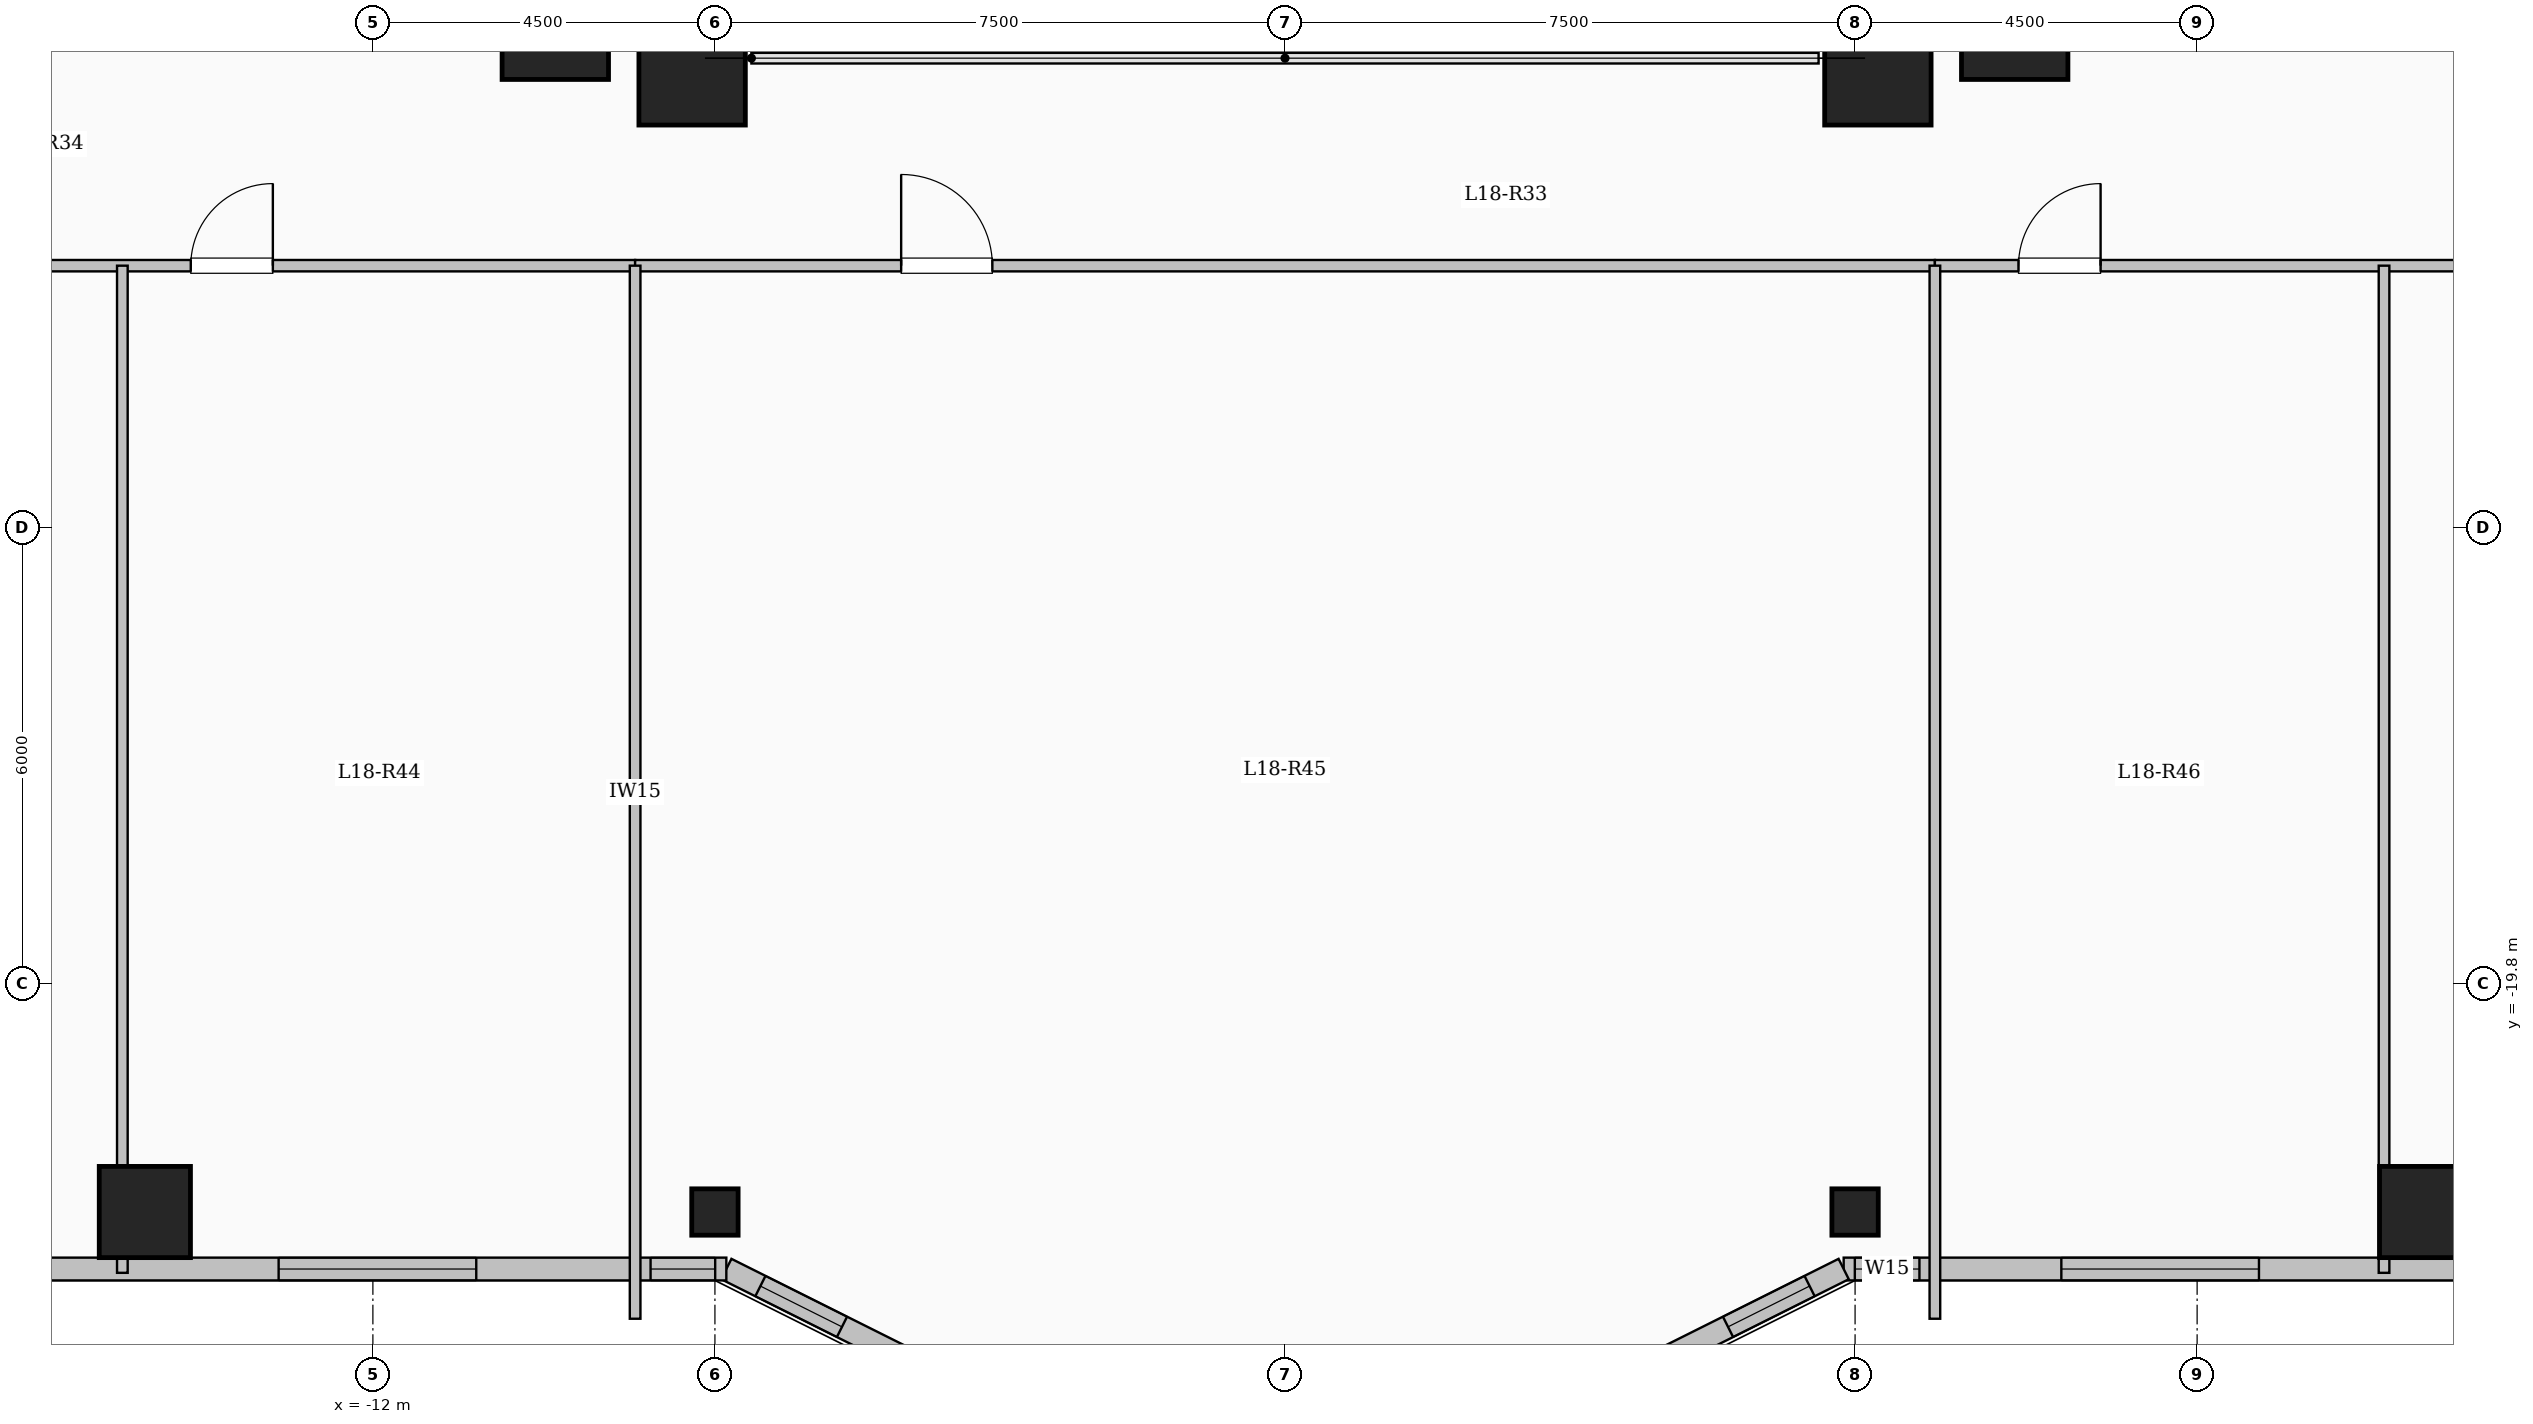
"""IFC4 building model, lengths in metres.
Left out: names, types, materials, properties, quantities, classifications, styles, units other than length and angle.
Written with IfcOpenShell. Run it as: python <this file> out.ifc"""

import sys

from ifc_helpers import new_model, si_unit, direction, frame, frame_2d, origin, origin_2d, place, context, subcontext, project, spatial, rectangle, hollow_circle, extrude, element, fill, save


model = new_model("IFC4")
c1 = context("Model", 3, precision=1e-05, world=origin(), true_north=direction((0.0, 1.0)))
c2 = subcontext(c1, "Body", "Model", "MODEL_VIEW")
j1 = project(units=[si_unit("LENGTHUNIT", "METRE"), si_unit("PLANEANGLEUNIT", "RADIAN")], contexts=[c1])
p1 = place(None, origin())
s1 = spatial("IfcSite", under=j1, at=p1, CompositionType="ELEMENT")
p2 = place(p1, origin())
s2 = spatial("IfcBuilding", under=s1, at=p2, CompositionType="ELEMENT")
p3 = place(p2, frame((0.0, 0.0, 68.7)))
s3 = spatial("IfcBuildingStorey", under=s2, at=p3, CompositionType="ELEMENT", Elevation=68.7)
for number, where, z_axis, x_axis in (
    (1, (-7.8, -7.8, 0.0), (0.0, 0.0, 1.0), (1.0, 0.0, 0.0)),
    (2, (7.8, -7.8, 0.0), (0.0, 0.0, 1.0), (1.0, 0.0, 0.0)),
    (3, (-9.6, -7.2, 0.0), (0.0, 0.0, 1.0), (1.0, 0.0, 0.0)),
    (4, (9.6, -7.2, 0.0), (0.0, 0.0, 1.0), (1.0, 0.0, 0.0)),
):
    element("IfcColumn", number, at=place(p3, frame(where, z_axis=z_axis, x_axis=x_axis)), inside=s3, PredefinedType="COLUMN", context=c2, shape_type="SweptSolid", body=[
        extrude(rectangle(XDim=1.4, YDim=1.4, at=origin_2d()), origin(), (0.0, 0.0, 1.0), 4.5),
    ])
p4 = place(p3, frame((-15.0, -22.8, 0.0), z_axis=(0.0, 0.0, 1.0), x_axis=(1.0, 0.0, 0.0)))
e5 = element("IfcColumn", 5, at=p4, inside=s3, PredefinedType="COLUMN", context=c2, shape_type="SweptSolid", body=[
    extrude(rectangle(XDim=1.2, YDim=1.2, at=origin_2d()), origin(), (0.0, 0.0, 1.0), 4.5),
])
for number, where, z_axis, x_axis in (
    (6, (-7.5, -22.8, 0.0), (0.0, 0.0, 1.0), (1.0, 0.0, 0.0)),
    (7, (7.5, -22.8, 0.0), (0.0, 0.0, 1.0), (1.0, 0.0, 0.0)),
):
    element("IfcColumn", number, at=place(p3, frame(where, z_axis=z_axis, x_axis=x_axis)), inside=s3, PredefinedType="COLUMN", context=c2, shape_type="SweptSolid", body=[
        extrude(hollow_circle(Radius=0.305, WallThickness=0.025, at=origin_2d()), origin(), (0.0, 0.0, 1.0), 4.5),
    ])
p5 = place(p3, frame((15.0, -22.8, 0.0), z_axis=(0.0, 0.0, 1.0), x_axis=(1.0, 0.0, 0.0)))
e8 = element("IfcColumn", 8, at=p5, inside=s3, PredefinedType="COLUMN", context=c2, shape_type="SweptSolid", body=[
    extrude(rectangle(XDim=1.2, YDim=1.2, at=origin_2d()), origin(), (0.0, 0.0, 1.0), 4.5),
])
p6 = place(p3, frame((7.62, -7.62, 0.0), z_axis=(0.0, 0.0, 1.0), x_axis=(0.0, 1.0, 0.0)))
e9 = element("IfcWall", 9, at=p6, inside=s3, PredefinedType="SOLIDWALL", context=c2, shape_type="SweptSolid", body=[
    extrude(rectangle(XDim=15.24, YDim=0.24, at=frame_2d((7.62, 0.0))), origin(), (0.0, 0.0, 1.0), 4.2),
])
p7 = place(p6, frame((6.92, 0.0, 0.95)))
e10 = element("IfcOpeningElement", 10, at=p7, cuts=e9, PredefinedType="OPENING", context=c2, shape_type="SweptSolid", body=[
    extrude(rectangle(XDim=1.4, YDim=1.5, at=frame_2d((0.7, 0.75))), frame((0.0, 0.13, 0.0), z_axis=(0.0, -1.0, 0.0), x_axis=(1.0, 0.0, 0.0)), (0.0, 0.0, 1.0), 0.26),
])
p8 = place(p3, frame((-7.62, 7.62, 0.0), z_axis=(0.0, 0.0, 1.0), x_axis=(0.0, -1.0, 0.0)))
e11 = element("IfcWall", 11, at=p8, inside=s3, PredefinedType="SOLIDWALL", context=c2, shape_type="SweptSolid", body=[
    extrude(rectangle(XDim=15.24, YDim=0.24, at=frame_2d((7.62, 0.0))), origin(), (0.0, 0.0, 1.0), 4.2),
])
p9 = place(p8, frame((6.92, 0.0, 0.95)))
e12 = element("IfcOpeningElement", 12, at=p9, cuts=e11, PredefinedType="OPENING", context=c2, shape_type="SweptSolid", body=[
    extrude(rectangle(XDim=1.4, YDim=1.5, at=frame_2d((0.7, 0.75))), frame((0.0, 0.13, 0.0), z_axis=(0.0, -1.0, 0.0), x_axis=(1.0, 0.0, 0.0)), (0.0, 0.0, 1.0), 0.26),
])
p10 = place(p3, frame((22.65, -23.55, 0.0), z_axis=(0.0, 0.0, 1.0), x_axis=(-1.0, 0.0, 0.0)))
e13 = element("IfcWall", 13, at=p10, inside=s3, PredefinedType="SOLIDWALL", context=c2, shape_type="SweptSolid", body=[
    extrude(rectangle(XDim=15.3, YDim=0.3, at=frame_2d((7.65, 0.0))), origin(), (0.0, 0.0, 1.0), 4.2),
])
p11 = place(p10, frame((2.788, 0.0, 0.85)))
e14 = element("IfcOpeningElement", 14, at=p11, cuts=e13, PredefinedType="OPENING", context=c2, shape_type="SweptSolid", body=[
    extrude(rectangle(XDim=2.6, YDim=2.4, at=frame_2d((1.3, 1.2))), frame((0.0, 0.16, 0.0), z_axis=(0.0, -1.0, 0.0), x_axis=(1.0, 0.0, 0.0)), (0.0, 0.0, 1.0), 0.32),
])
p12 = place(p10, frame((9.836, 0.0, 0.85)))
e15 = element("IfcOpeningElement", 15, at=p12, cuts=e13, PredefinedType="OPENING", context=c2, shape_type="SweptSolid", body=[
    extrude(rectangle(XDim=2.6, YDim=2.4, at=frame_2d((1.3, 1.2))), frame((0.0, 0.16, 0.0), z_axis=(0.0, -1.0, 0.0), x_axis=(1.0, 0.0, 0.0)), (0.0, 0.0, 1.0), 0.32),
])
p13 = place(p10, frame((14.303, 0.0, 0.95)))
e16 = element("IfcOpeningElement", 16, at=p13, cuts=e13, PredefinedType="OPENING", context=c2, shape_type="SweptSolid", body=[
    extrude(rectangle(XDim=0.85, YDim=1.5, at=frame_2d((0.425, 0.75))), frame((0.0, 0.16, 0.0), z_axis=(0.0, -1.0, 0.0), x_axis=(1.0, 0.0, 0.0)), (0.0, 0.0, 1.0), 0.32),
])
p14 = place(p3, frame((7.35, -23.55, 0.0), z_axis=(0.0, 0.0, 1.0), x_axis=(-0.894427191, -0.4472135955, 0.0)))
e17 = element("IfcWall", 17, at=p14, inside=s3, PredefinedType="SOLIDWALL", context=c2, shape_type="SweptSolid", body=[
    extrude(rectangle(XDim=3.354, YDim=0.3, at=frame_2d((1.677, 0.0))), origin(), (0.0, 0.0, 1.0), 4.2),
])
p15 = place(p14, frame((0.501, 0.0, 0.95)))
e18 = element("IfcOpeningElement", 18, at=p15, cuts=e17, PredefinedType="OPENING", context=c2, shape_type="SweptSolid", body=[
    extrude(rectangle(XDim=1.2, YDim=1.5, at=frame_2d((0.6, 0.75))), frame((0.0, 0.16, 0.0), z_axis=(0.0, -1.0, 0.0), x_axis=(1.0, 0.0, 0.0)), (0.0, 0.0, 1.0), 0.32),
])
p16 = place(p3, frame((-4.35, -25.05, 0.0), z_axis=(0.0, 0.0, 1.0), x_axis=(-0.894427191, 0.4472135955, 0.0)))
e19 = element("IfcWall", 19, at=p16, inside=s3, PredefinedType="SOLIDWALL", context=c2, shape_type="SweptSolid", body=[
    extrude(rectangle(XDim=3.354, YDim=0.3, at=frame_2d((1.677, 0.0))), origin(), (0.0, 0.0, 1.0), 4.2),
])
p17 = place(p16, frame((1.653, 0.0, 0.95)))
e20 = element("IfcOpeningElement", 20, at=p17, cuts=e19, PredefinedType="OPENING", context=c2, shape_type="SweptSolid", body=[
    extrude(rectangle(XDim=1.2, YDim=1.5, at=frame_2d((0.6, 0.75))), frame((0.0, 0.16, 0.0), z_axis=(0.0, -1.0, 0.0), x_axis=(1.0, 0.0, 0.0)), (0.0, 0.0, 1.0), 0.32),
])
p18 = place(p3, frame((-7.35, -23.55, 0.0), z_axis=(0.0, 0.0, 1.0), x_axis=(-1.0, 0.0, 0.0)))
e21 = element("IfcWall", 21, at=p18, inside=s3, PredefinedType="SOLIDWALL", context=c2, shape_type="SweptSolid", body=[
    extrude(rectangle(XDim=15.3, YDim=0.3, at=frame_2d((7.65, 0.0))), origin(), (0.0, 0.0, 1.0), 4.2),
])
p19 = place(p18, frame((0.147, 0.0, 0.95)))
e22 = element("IfcOpeningElement", 22, at=p19, cuts=e21, PredefinedType="OPENING", context=c2, shape_type="SweptSolid", body=[
    extrude(rectangle(XDim=0.85, YDim=1.5, at=frame_2d((0.425, 0.75))), frame((0.0, 0.16, 0.0), z_axis=(0.0, -1.0, 0.0), x_axis=(1.0, 0.0, 0.0)), (0.0, 0.0, 1.0), 0.32),
])
p20 = place(p18, frame((3.29, 0.0, 0.85)))
e23 = element("IfcOpeningElement", 23, at=p20, cuts=e21, PredefinedType="OPENING", context=c2, shape_type="SweptSolid", body=[
    extrude(rectangle(XDim=2.6, YDim=2.4, at=frame_2d((1.3, 1.2))), frame((0.0, 0.16, 0.0), z_axis=(0.0, -1.0, 0.0), x_axis=(1.0, 0.0, 0.0)), (0.0, 0.0, 1.0), 0.32),
])
p21 = place(p18, frame((10.313, 0.0, 0.85)))
e24 = element("IfcOpeningElement", 24, at=p21, cuts=e21, PredefinedType="OPENING", context=c2, shape_type="SweptSolid", body=[
    extrude(rectangle(XDim=2.6, YDim=2.4, at=frame_2d((1.3, 1.2))), frame((0.0, 0.16, 0.0), z_axis=(0.0, -1.0, 0.0), x_axis=(1.0, 0.0, 0.0)), (0.0, 0.0, 1.0), 0.32),
])
p22 = place(p3, frame((-22.55, -10.35, 0.0), z_axis=(0.0, 0.0, 1.0), x_axis=(1.0, 0.0, 0.0)))
e25 = element("IfcWall", 25, at=p22, inside=s3, PredefinedType="PARTITIONING", context=c2, shape_type="SweptSolid", body=[
    extrude(rectangle(XDim=14.0, YDim=0.15, at=frame_2d((7.0, 0.0))), origin(), (0.0, 0.0, 1.0), 4.2),
])
p23 = place(p22, frame((1.1, 0.0, 0.0)))
e26 = element("IfcOpeningElement", 26, at=p23, cuts=e25, PredefinedType="OPENING", context=c2, shape_type="SweptSolid", body=[
    extrude(rectangle(XDim=1.08, YDim=2.15, at=frame_2d((0.54, 1.075))), frame((0.0, 0.085, 0.0), z_axis=(0.0, -1.0, 0.0), x_axis=(1.0, 0.0, 0.0)), (0.0, 0.0, 1.0), 0.17),
])
p24 = place(p22, frame((8.154, 0.0, 0.0)))
e27 = element("IfcOpeningElement", 27, at=p24, cuts=e25, PredefinedType="OPENING", context=c2, shape_type="SweptSolid", body=[
    extrude(rectangle(XDim=1.08, YDim=2.15, at=frame_2d((0.54, 1.075))), frame((0.0, 0.085, 0.0), z_axis=(0.0, -1.0, 0.0), x_axis=(1.0, 0.0, 0.0)), (0.0, 0.0, 1.0), 0.17),
])
p25 = place(p3, frame((-8.55, -10.35, 0.0), z_axis=(0.0, 0.0, 1.0), x_axis=(1.0, 0.0, 0.0)))
e28 = element("IfcWall", 28, at=p25, inside=s3, PredefinedType="PARTITIONING", context=c2, shape_type="SweptSolid", body=[
    extrude(rectangle(XDim=17.1, YDim=0.15, at=frame_2d((8.55, 0.0))), origin(), (0.0, 0.0, 1.0), 4.2),
])
p26 = place(p25, frame((3.5, 0.0, 0.0)))
e29 = element("IfcOpeningElement", 29, at=p26, cuts=e28, PredefinedType="OPENING", context=c2, shape_type="SweptSolid", body=[
    extrude(rectangle(XDim=1.2, YDim=2.15, at=frame_2d((0.6, 1.075))), frame((0.0, 0.085, 0.0), z_axis=(0.0, -1.0, 0.0), x_axis=(1.0, 0.0, 0.0)), (0.0, 0.0, 1.0), 0.17),
])
p27 = place(p3, frame((8.55, -10.35, 0.0), z_axis=(0.0, 0.0, 1.0), x_axis=(1.0, 0.0, 0.0)))
e30 = element("IfcWall", 30, at=p27, inside=s3, PredefinedType="PARTITIONING", context=c2, shape_type="SweptSolid", body=[
    extrude(rectangle(XDim=14.0, YDim=0.15, at=frame_2d((7.0, 0.0))), origin(), (0.0, 0.0, 1.0), 4.2),
])
p28 = place(p27, frame((1.1, 0.0, 0.0)))
e31 = element("IfcOpeningElement", 31, at=p28, cuts=e30, PredefinedType="OPENING", context=c2, shape_type="SweptSolid", body=[
    extrude(rectangle(XDim=1.08, YDim=2.15, at=frame_2d((0.54, 1.075))), frame((0.0, 0.085, 0.0), z_axis=(0.0, -1.0, 0.0), x_axis=(1.0, 0.0, 0.0)), (0.0, 0.0, 1.0), 0.17),
])
p29 = place(p27, frame((6.909, 0.0, 0.0)))
e32 = element("IfcOpeningElement", 32, at=p29, cuts=e30, PredefinedType="OPENING", context=c2, shape_type="SweptSolid", body=[
    extrude(rectangle(XDim=1.2, YDim=2.15, at=frame_2d((0.6, 1.075))), frame((0.0, 0.085, 0.0), z_axis=(0.0, -1.0, 0.0), x_axis=(1.0, 0.0, 0.0)), (0.0, 0.0, 1.0), 0.17),
])
p30 = place(p3, frame((-15.296, -23.6, 0.0), z_axis=(0.0, 0.0, 1.0), x_axis=(0.0, 1.0, 0.0)))
e33 = element("IfcWall", 33, at=p30, inside=s3, PredefinedType="PARTITIONING", context=c2, shape_type="SweptSolid", body=[
    extrude(rectangle(XDim=13.25, YDim=0.14, at=frame_2d((6.625, 0.0))), origin(), (0.0, 0.0, 1.0), 3.535),
])
for number, where, z_axis, x_axis in (
    (34, (-8.55, -24.204, 0.0), (0.0, 0.0, 1.0), (0.0, 1.0, 0.0)),
    (35, (8.55, -24.204, 0.0), (0.0, 0.0, 1.0), (0.0, 1.0, 0.0)),
):
    element("IfcWall", number, at=place(p3, frame(where, z_axis=z_axis, x_axis=x_axis)), inside=s3, PredefinedType="PARTITIONING", context=c2, shape_type="SweptSolid", body=[
        extrude(rectangle(XDim=13.854, YDim=0.14, at=frame_2d((6.927, 0.0))), origin(), (0.0, 0.0, 1.0), 4.2),
    ])
p31 = place(p3, frame((14.459, -23.6, 0.0), z_axis=(0.0, 0.0, 1.0), x_axis=(0.0, 1.0, 0.0)))
e36 = element("IfcWall", 36, at=p31, inside=s3, PredefinedType="PARTITIONING", context=c2, shape_type="SweptSolid", body=[
    extrude(rectangle(XDim=13.25, YDim=0.14, at=frame_2d((6.625, 0.0))), origin(), (0.0, 0.0, 1.0), 4.2),
])
p32 = place(p12, origin())
e37 = element("IfcWindow", 37, at=p32, inside=s3, PartitioningType="SINGLE_PANEL", PredefinedType="WINDOW", context=c2, shape_type="SweptSolid", body=[
    extrude(rectangle(XDim=2.6, YDim=2.4, at=frame_2d((1.3, 1.2))), frame((0.0, 0.03, 0.0), z_axis=(0.0, -1.0, 0.0), x_axis=(1.0, 0.0, 0.0)), (0.0, 0.0, 1.0), 0.06),
])
fill(e15, e37)
p33 = place(p13, origin())
e38 = element("IfcWindow", 38, at=p33, inside=s3, PartitioningType="SINGLE_PANEL", PredefinedType="WINDOW", context=c2, shape_type="SweptSolid", body=[
    extrude(rectangle(XDim=0.85, YDim=1.5, at=frame_2d((0.425, 0.75))), frame((0.0, 0.03, 0.0), z_axis=(0.0, -1.0, 0.0), x_axis=(1.0, 0.0, 0.0)), (0.0, 0.0, 1.0), 0.06),
])
fill(e16, e38)
p34 = place(p15, origin())
e39 = element("IfcWindow", 39, at=p34, inside=s3, PartitioningType="SINGLE_PANEL", PredefinedType="WINDOW", context=c2, shape_type="SweptSolid", body=[
    extrude(rectangle(XDim=1.2, YDim=1.5, at=frame_2d((0.6, 0.75))), frame((0.0, 0.03, 0.0), z_axis=(0.0, -1.0, 0.0), x_axis=(1.0, 0.0, 0.0)), (0.0, 0.0, 1.0), 0.06),
])
fill(e18, e39)
p35 = place(p17, origin())
e40 = element("IfcWindow", 40, at=p35, inside=s3, PartitioningType="SINGLE_PANEL", PredefinedType="WINDOW", context=c2, shape_type="SweptSolid", body=[
    extrude(rectangle(XDim=1.2, YDim=1.5, at=frame_2d((0.6, 0.75))), frame((0.0, 0.03, 0.0), z_axis=(0.0, -1.0, 0.0), x_axis=(1.0, 0.0, 0.0)), (0.0, 0.0, 1.0), 0.06),
])
fill(e20, e40)
p36 = place(p19, origin())
e41 = element("IfcWindow", 41, at=p36, inside=s3, PartitioningType="SINGLE_PANEL", PredefinedType="WINDOW", context=c2, shape_type="SweptSolid", body=[
    extrude(rectangle(XDim=0.85, YDim=1.5, at=frame_2d((0.425, 0.75))), frame((0.0, 0.03, 0.0), z_axis=(0.0, -1.0, 0.0), x_axis=(1.0, 0.0, 0.0)), (0.0, 0.0, 1.0), 0.06),
])
fill(e22, e41)
p37 = place(p20, origin())
e42 = element("IfcWindow", 42, at=p37, inside=s3, PartitioningType="SINGLE_PANEL", PredefinedType="WINDOW", context=c2, shape_type="SweptSolid", body=[
    extrude(rectangle(XDim=2.6, YDim=2.4, at=frame_2d((1.3, 1.2))), frame((0.0, 0.03, 0.0), z_axis=(0.0, -1.0, 0.0), x_axis=(1.0, 0.0, 0.0)), (0.0, 0.0, 1.0), 0.06),
])
fill(e23, e42)
p38 = place(p24, origin())
e43 = element("IfcDoor", 43, at=p38, inside=s3, OperationType="SINGLE_SWING_RIGHT", PredefinedType="DOOR", context=c2, shape_type="SweptSolid", body=[
    extrude(rectangle(XDim=1.08, YDim=2.15, at=frame_2d((0.54, 1.075))), frame((0.0, 0.025, 0.0), z_axis=(0.0, -1.0, 0.0), x_axis=(1.0, 0.0, 0.0)), (0.0, 0.0, 1.0), 0.05),
])
fill(e27, e43)
p39 = place(p26, origin())
e44 = element("IfcDoor", 44, at=p39, inside=s3, OperationType="SINGLE_SWING_LEFT", PredefinedType="DOOR", context=c2, shape_type="SweptSolid", body=[
    extrude(rectangle(XDim=1.2, YDim=2.15, at=frame_2d((0.6, 1.075))), frame((0.0, 0.025, 0.0), z_axis=(0.0, -1.0, 0.0), x_axis=(1.0, 0.0, 0.0)), (0.0, 0.0, 1.0), 0.05),
])
fill(e29, e44)
p40 = place(p28, origin())
e45 = element("IfcDoor", 45, at=p40, inside=s3, OperationType="SINGLE_SWING_RIGHT", PredefinedType="DOOR", context=c2, shape_type="SweptSolid", body=[
    extrude(rectangle(XDim=1.08, YDim=2.15, at=frame_2d((0.54, 1.075))), frame((0.0, 0.025, 0.0), z_axis=(0.0, -1.0, 0.0), x_axis=(1.0, 0.0, 0.0)), (0.0, 0.0, 1.0), 0.05),
])
fill(e31, e45)
save(model, sys.argv[1])
